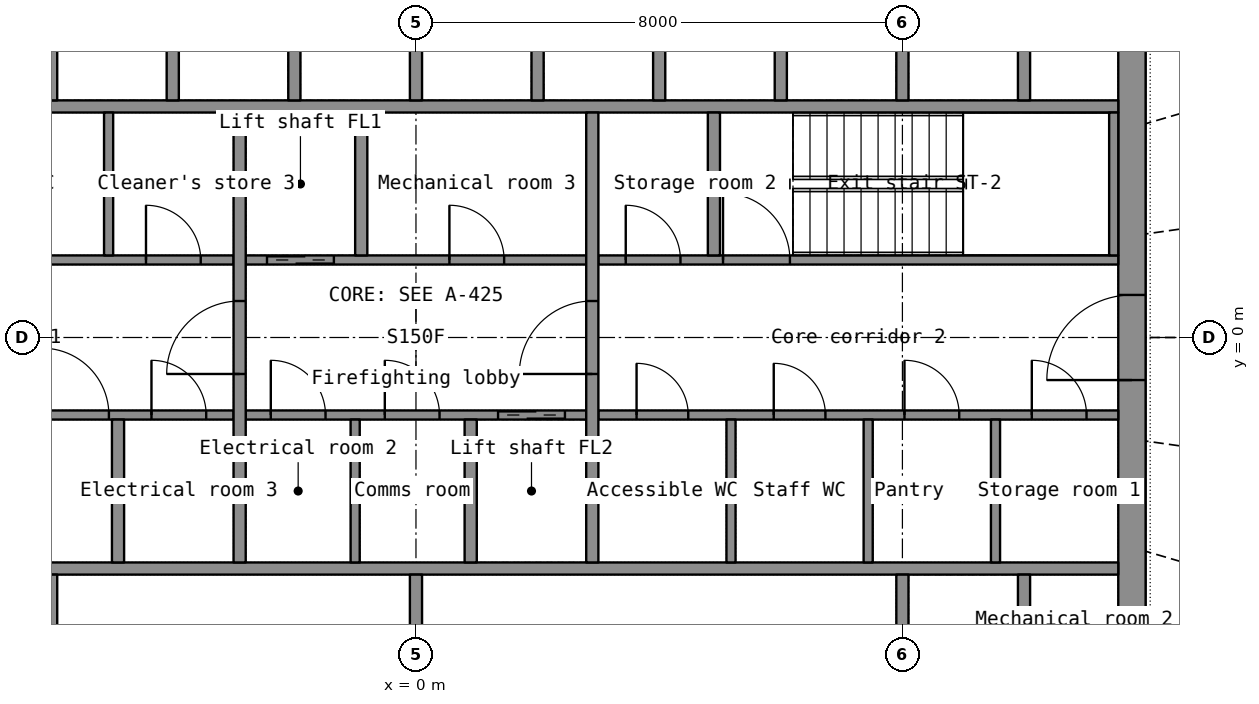
"""IFC4 building model, lengths in metres.
Left out: names, types, materials, properties, quantities, classifications, styles, units other than length and angle.
Written with IfcOpenShell. Run it as: python <this file> out.ifc"""

import sys

from ifc_helpers import new_model, si_unit, direction, frame, frame_2d, origin, place, context, subcontext, project, spatial, rectangle, extrude, element, fill, save


model = new_model("IFC4")
c1 = context("Model", 3, precision=1e-05, world=origin(), true_north=direction((0.0, 1.0)))
c2 = subcontext(c1, "Body", "Model", "MODEL_VIEW")
j1 = project(units=[si_unit("LENGTHUNIT", "METRE"), si_unit("PLANEANGLEUNIT", "RADIAN")], contexts=[c1])
p1 = place(None, origin())
s1 = spatial("IfcSite", under=j1, at=p1, CompositionType="ELEMENT")
p2 = place(p1, origin())
s2 = spatial("IfcBuilding", under=s1, at=p2, CompositionType="ELEMENT")
p3 = place(p2, frame((0.0, 0.0, 190.4)))
s3 = spatial("IfcBuildingStorey", under=s2, at=p3, CompositionType="ELEMENT", Elevation=190.4)
p4 = place(p3, frame((11.775, -7.2, 0.0), z_axis=(0.0, 0.0, 1.0), x_axis=(0.0, 1.0, 0.0)))
e1 = element("IfcWall", 1, at=p4, inside=s3, PredefinedType="SHEAR", context=c2, shape_type="SweptSolid", body=[
    extrude(rectangle(XDim=14.4, YDim=0.45, at=frame_2d((7.2, 0.0))), origin(), (0.0, 0.0, 1.0), 3.3),
])
p5 = place(p4, frame((6.5, 0.0, 0.0)))
e2 = element("IfcOpeningElement", 2, at=p5, cuts=e1, PredefinedType="OPENING", context=c2, shape_type="SweptSolid", body=[
    extrude(rectangle(XDim=1.4, YDim=2.2, at=frame_2d((0.7, 1.1))), frame((0.0, 0.235, 0.0), z_axis=(0.0, -1.0, 0.0), x_axis=(1.0, 0.0, 0.0)), (0.0, 0.0, 1.0), 0.47),
])
for number, where, z_axis, x_axis in (
    (3, (-11.55, -3.8, 0.0), (0.0, 0.0, 1.0), (1.0, 0.0, 0.0)),
    (4, (-11.55, 3.8, 0.0), (0.0, 0.0, 1.0), (1.0, 0.0, 0.0)),
):
    element("IfcWall", number, at=place(p3, frame(where, z_axis=z_axis, x_axis=x_axis)), inside=s3, PredefinedType="SHEAR", context=c2, shape_type="SweptSolid", body=[
        extrude(rectangle(XDim=23.1, YDim=0.2, at=frame_2d((11.55, 0.0))), origin(), (0.0, 0.0, 1.0), 3.3),
    ])
for number, where, z_axis, x_axis in (
    (5, (8.0, -6.75, 0.0), (0.0, 0.0, 1.0), (0.0, 1.0, 0.0)),
    (6, (10.0, -6.75, 0.0), (0.0, 0.0, 1.0), (0.0, 1.0, 0.0)),
):
    element("IfcWall", number, at=place(p3, frame(where, z_axis=z_axis, x_axis=x_axis)), inside=s3, PredefinedType="SHEAR", context=c2, shape_type="SweptSolid", body=[
        extrude(rectangle(XDim=2.85, YDim=0.2, at=frame_2d((1.425, 0.0))), origin(), (0.0, 0.0, 1.0), 3.3),
    ])
for number, where, z_axis, x_axis in (
    (7, (-6.0, -6.75, 0.0), (0.0, 0.0, 1.0), (0.0, 1.0, 0.0)),
    (8, (0.0, -6.75, 0.0), (0.0, 0.0, 1.0), (0.0, 1.0, 0.0)),
):
    element("IfcWall", number, at=place(p3, frame(where, z_axis=z_axis, x_axis=x_axis)), inside=s3, PredefinedType="PARTITIONING", context=c2, shape_type="SweptSolid", body=[
        extrude(rectangle(XDim=2.85, YDim=0.2, at=frame_2d((1.425, 0.0))), origin(), (0.0, 0.0, 1.0), 3.3),
    ])
for number, where, z_axis, x_axis in (
    (9, (-6.0, 3.9, 0.0), (0.0, 0.0, 1.0), (0.0, 1.0, 0.0)),
    (10, (-4.0, 3.9, 0.0), (0.0, 0.0, 1.0), (0.0, 1.0, 0.0)),
    (11, (-2.0, 3.9, 0.0), (0.0, 0.0, 1.0), (0.0, 1.0, 0.0)),
    (12, (0.0, 3.9, 0.0), (0.0, 0.0, 1.0), (0.0, 1.0, 0.0)),
    (13, (2.0, 3.9, 0.0), (0.0, 0.0, 1.0), (0.0, 1.0, 0.0)),
    (14, (4.0, 3.9, 0.0), (0.0, 0.0, 1.0), (0.0, 1.0, 0.0)),
    (15, (6.0, 3.9, 0.0), (0.0, 0.0, 1.0), (0.0, 1.0, 0.0)),
    (16, (8.0, 3.9, 0.0), (0.0, 0.0, 1.0), (0.0, 1.0, 0.0)),
    (17, (10.0, 3.9, 0.0), (0.0, 0.0, 1.0), (0.0, 1.0, 0.0)),
):
    element("IfcWall", number, at=place(p3, frame(where, z_axis=z_axis, x_axis=x_axis)), inside=s3, PredefinedType="SHEAR", context=c2, shape_type="SweptSolid", body=[
        extrude(rectangle(XDim=2.85, YDim=0.2, at=frame_2d((1.425, 0.0))), origin(), (0.0, 0.0, 1.0), 3.3),
    ])
p6 = place(p3, frame((-11.55, -1.275, 0.0), z_axis=(0.0, 0.0, 1.0), x_axis=(1.0, 0.0, 0.0)))
e18 = element("IfcWall", 18, at=p6, inside=s3, PredefinedType="SHEAR", context=c2, shape_type="SweptSolid", body=[
    extrude(rectangle(XDim=8.55, YDim=0.15, at=frame_2d((4.275, 0.0))), origin(), (0.0, 0.0, 1.0), 3.3),
])
p7 = place(p6, frame((5.4, 0.0, 0.0)))
e19 = element("IfcOpeningElement", 19, at=p7, cuts=e18, PredefinedType="OPENING", context=c2, shape_type="SweptSolid", body=[
    extrude(rectangle(XDim=1.1, YDim=2.15, at=frame_2d((0.55, 1.075))), frame((0.0, 0.085, 0.0), z_axis=(0.0, -1.0, 0.0), x_axis=(1.0, 0.0, 0.0)), (0.0, 0.0, 1.0), 0.17),
])
p8 = place(p6, frame((7.2, 0.0, 0.0)))
e20 = element("IfcOpeningElement", 20, at=p8, cuts=e18, PredefinedType="OPENING", context=c2, shape_type="SweptSolid", body=[
    extrude(rectangle(XDim=0.9, YDim=2.1, at=frame_2d((0.45, 1.05))), frame((0.0, 0.085, 0.0), z_axis=(0.0, -1.0, 0.0), x_axis=(1.0, 0.0, 0.0)), (0.0, 0.0, 1.0), 0.17),
])
p9 = place(p3, frame((-2.8, -1.275, 0.0), z_axis=(0.0, 0.0, 1.0), x_axis=(1.0, 0.0, 0.0)))
e21 = element("IfcWall", 21, at=p9, inside=s3, PredefinedType="SHEAR", context=c2, shape_type="SweptSolid", body=[
    extrude(rectangle(XDim=5.6, YDim=0.15, at=frame_2d((2.8, 0.0))), origin(), (0.0, 0.0, 1.0), 3.3),
])
p10 = place(p9, frame((4.15, 0.0, 0.0)))
e22 = element("IfcOpeningElement", 22, at=p10, cuts=e21, PredefinedType="OPENING", context=c2, shape_type="SweptSolid", body=[
    extrude(rectangle(XDim=1.1, YDim=2.2, at=frame_2d((0.55, 1.1))), frame((0.0, 0.085, 0.0), z_axis=(0.0, -1.0, 0.0), x_axis=(1.0, 0.0, 0.0)), (0.0, 0.0, 1.0), 0.17),
])
p11 = place(p9, frame((0.413, 0.0, 0.0)))
e23 = element("IfcOpeningElement", 23, at=p11, cuts=e21, PredefinedType="OPENING", context=c2, shape_type="SweptSolid", body=[
    extrude(rectangle(XDim=0.9, YDim=2.1, at=frame_2d((0.45, 1.05))), frame((0.0, 0.085, 0.0), z_axis=(0.0, -1.0, 0.0), x_axis=(1.0, 0.0, 0.0)), (0.0, 0.0, 1.0), 0.17),
])
p12 = place(p9, frame((2.288, 0.0, 0.0)))
e24 = element("IfcOpeningElement", 24, at=p12, cuts=e21, PredefinedType="OPENING", context=c2, shape_type="SweptSolid", body=[
    extrude(rectangle(XDim=0.9, YDim=2.1, at=frame_2d((0.45, 1.05))), frame((0.0, 0.085, 0.0), z_axis=(0.0, -1.0, 0.0), x_axis=(1.0, 0.0, 0.0)), (0.0, 0.0, 1.0), 0.17),
])
p13 = place(p3, frame((3.0, -1.275, 0.0), z_axis=(0.0, 0.0, 1.0), x_axis=(1.0, 0.0, 0.0)))
e25 = element("IfcWall", 25, at=p13, inside=s3, PredefinedType="PARTITIONING", context=c2, shape_type="SweptSolid", body=[
    extrude(rectangle(XDim=8.55, YDim=0.15, at=frame_2d((4.275, 0.0))), origin(), (0.0, 0.0, 1.0), 3.3),
])
p14 = place(p13, frame((0.628, 0.0, 0.0)))
e26 = element("IfcOpeningElement", 26, at=p14, cuts=e25, PredefinedType="OPENING", context=c2, shape_type="SweptSolid", body=[
    extrude(rectangle(XDim=0.85, YDim=2.1, at=frame_2d((0.425, 1.05))), frame((0.0, 0.085, 0.0), z_axis=(0.0, -1.0, 0.0), x_axis=(1.0, 0.0, 0.0)), (0.0, 0.0, 1.0), 0.17),
])
p15 = place(p13, frame((2.884, 0.0, 0.0)))
e27 = element("IfcOpeningElement", 27, at=p15, cuts=e25, PredefinedType="OPENING", context=c2, shape_type="SweptSolid", body=[
    extrude(rectangle(XDim=0.85, YDim=2.1, at=frame_2d((0.425, 1.05))), frame((0.0, 0.085, 0.0), z_axis=(0.0, -1.0, 0.0), x_axis=(1.0, 0.0, 0.0)), (0.0, 0.0, 1.0), 0.17),
])
p16 = place(p13, frame((5.034, 0.0, 0.0)))
e28 = element("IfcOpeningElement", 28, at=p16, cuts=e25, PredefinedType="OPENING", context=c2, shape_type="SweptSolid", body=[
    extrude(rectangle(XDim=0.9, YDim=2.1, at=frame_2d((0.45, 1.05))), frame((0.0, 0.085, 0.0), z_axis=(0.0, -1.0, 0.0), x_axis=(1.0, 0.0, 0.0)), (0.0, 0.0, 1.0), 0.17),
])
p17 = place(p13, frame((7.128, 0.0, 0.0)))
e29 = element("IfcOpeningElement", 29, at=p17, cuts=e25, PredefinedType="OPENING", context=c2, shape_type="SweptSolid", body=[
    extrude(rectangle(XDim=0.9, YDim=2.1, at=frame_2d((0.45, 1.05))), frame((0.0, 0.085, 0.0), z_axis=(0.0, -1.0, 0.0), x_axis=(1.0, 0.0, 0.0)), (0.0, 0.0, 1.0), 0.17),
])
p18 = place(p3, frame((-11.55, 1.275, 0.0), z_axis=(0.0, 0.0, 1.0), x_axis=(1.0, 0.0, 0.0)))
e30 = element("IfcWall", 30, at=p18, inside=s3, PredefinedType="PARTITIONING", context=c2, shape_type="SweptSolid", body=[
    extrude(rectangle(XDim=8.55, YDim=0.15, at=frame_2d((4.275, 0.0))), origin(), (0.0, 0.0, 1.0), 3.3),
])
p19 = place(p18, frame((1.143, 0.0, 0.0)))
e31 = element("IfcOpeningElement", 31, at=p19, cuts=e30, PredefinedType="OPENING", context=c2, shape_type="SweptSolid", body=[
    extrude(rectangle(XDim=0.85, YDim=2.1, at=frame_2d((0.425, 1.05))), frame((0.0, 0.085, 0.0), z_axis=(0.0, -1.0, 0.0), x_axis=(1.0, 0.0, 0.0)), (0.0, 0.0, 1.0), 0.17),
])
p20 = place(p18, frame((4.427, 0.0, 0.0)))
e32 = element("IfcOpeningElement", 32, at=p20, cuts=e30, PredefinedType="OPENING", context=c2, shape_type="SweptSolid", body=[
    extrude(rectangle(XDim=0.85, YDim=2.1, at=frame_2d((0.425, 1.05))), frame((0.0, 0.085, 0.0), z_axis=(0.0, -1.0, 0.0), x_axis=(1.0, 0.0, 0.0)), (0.0, 0.0, 1.0), 0.17),
])
p21 = place(p18, frame((7.11, 0.0, 0.0)))
e33 = element("IfcOpeningElement", 33, at=p21, cuts=e30, PredefinedType="OPENING", context=c2, shape_type="SweptSolid", body=[
    extrude(rectangle(XDim=0.9, YDim=2.1, at=frame_2d((0.45, 1.05))), frame((0.0, 0.085, 0.0), z_axis=(0.0, -1.0, 0.0), x_axis=(1.0, 0.0, 0.0)), (0.0, 0.0, 1.0), 0.17),
])
p22 = place(p3, frame((-2.8, 1.275, 0.0), z_axis=(0.0, 0.0, 1.0), x_axis=(1.0, 0.0, 0.0)))
e34 = element("IfcWall", 34, at=p22, inside=s3, PredefinedType="SHEAR", context=c2, shape_type="SweptSolid", body=[
    extrude(rectangle(XDim=5.6, YDim=0.15, at=frame_2d((2.8, 0.0))), origin(), (0.0, 0.0, 1.0), 3.3),
])
p23 = place(p22, frame((0.35, 0.0, 0.0)))
e35 = element("IfcOpeningElement", 35, at=p23, cuts=e34, PredefinedType="OPENING", context=c2, shape_type="SweptSolid", body=[
    extrude(rectangle(XDim=1.1, YDim=2.2, at=frame_2d((0.55, 1.1))), frame((0.0, 0.085, 0.0), z_axis=(0.0, -1.0, 0.0), x_axis=(1.0, 0.0, 0.0)), (0.0, 0.0, 1.0), 0.17),
])
p24 = place(p22, frame((3.35, 0.0, 0.0)))
e36 = element("IfcOpeningElement", 36, at=p24, cuts=e34, PredefinedType="OPENING", context=c2, shape_type="SweptSolid", body=[
    extrude(rectangle(XDim=0.9, YDim=2.1, at=frame_2d((0.45, 1.05))), frame((0.0, 0.085, 0.0), z_axis=(0.0, -1.0, 0.0), x_axis=(1.0, 0.0, 0.0)), (0.0, 0.0, 1.0), 0.17),
])
p25 = place(p3, frame((3.0, 1.275, 0.0), z_axis=(0.0, 0.0, 1.0), x_axis=(1.0, 0.0, 0.0)))
e37 = element("IfcWall", 37, at=p25, inside=s3, PredefinedType="SHEAR", context=c2, shape_type="SweptSolid", body=[
    extrude(rectangle(XDim=8.55, YDim=0.15, at=frame_2d((4.275, 0.0))), origin(), (0.0, 0.0, 1.0), 3.3),
])
p26 = place(p25, frame((2.05, 0.0, 0.0)))
e38 = element("IfcOpeningElement", 38, at=p26, cuts=e37, PredefinedType="OPENING", context=c2, shape_type="SweptSolid", body=[
    extrude(rectangle(XDim=1.1, YDim=2.15, at=frame_2d((0.55, 1.075))), frame((0.0, 0.085, 0.0), z_axis=(0.0, -1.0, 0.0), x_axis=(1.0, 0.0, 0.0)), (0.0, 0.0, 1.0), 0.17),
])
p27 = place(p25, frame((0.45, 0.0, 0.0)))
e39 = element("IfcOpeningElement", 39, at=p27, cuts=e37, PredefinedType="OPENING", context=c2, shape_type="SweptSolid", body=[
    extrude(rectangle(XDim=0.9, YDim=2.1, at=frame_2d((0.45, 1.05))), frame((0.0, 0.085, 0.0), z_axis=(0.0, -1.0, 0.0), x_axis=(1.0, 0.0, 0.0)), (0.0, 0.0, 1.0), 0.17),
])
p28 = place(p3, frame((-2.9, -3.7, 0.0), z_axis=(0.0, 0.0, 1.0), x_axis=(0.0, 1.0, 0.0)))
e40 = element("IfcWall", 40, at=p28, inside=s3, PredefinedType="SHEAR", context=c2, shape_type="SweptSolid", body=[
    extrude(rectangle(XDim=7.4, YDim=0.2, at=frame_2d((3.7, 0.0))), origin(), (0.0, 0.0, 1.0), 3.3),
])
p29 = place(p28, frame((3.1, 0.0, 0.0)))
e41 = element("IfcOpeningElement", 41, at=p29, cuts=e40, PredefinedType="OPENING", context=c2, shape_type="SweptSolid", body=[
    extrude(rectangle(XDim=1.2, YDim=2.2, at=frame_2d((0.6, 1.1))), frame((0.0, 0.11, 0.0), z_axis=(0.0, -1.0, 0.0), x_axis=(1.0, 0.0, 0.0)), (0.0, 0.0, 1.0), 0.22),
])
p30 = place(p3, frame((2.9, -3.7, 0.0), z_axis=(0.0, 0.0, 1.0), x_axis=(0.0, 1.0, 0.0)))
e42 = element("IfcWall", 42, at=p30, inside=s3, PredefinedType="SHEAR", context=c2, shape_type="SweptSolid", body=[
    extrude(rectangle(XDim=7.4, YDim=0.2, at=frame_2d((3.7, 0.0))), origin(), (0.0, 0.0, 1.0), 3.3),
])
p31 = place(p30, frame((3.1, 0.0, 0.0)))
e43 = element("IfcOpeningElement", 43, at=p31, cuts=e42, PredefinedType="OPENING", context=c2, shape_type="SweptSolid", body=[
    extrude(rectangle(XDim=1.2, YDim=2.2, at=frame_2d((0.6, 1.1))), frame((0.0, 0.11, 0.0), z_axis=(0.0, -1.0, 0.0), x_axis=(1.0, 0.0, 0.0)), (0.0, 0.0, 1.0), 0.22),
])
for number, where, z_axis, x_axis in (
    (44, (-0.9, 1.35, 0.0), (0.0, 0.0, 1.0), (0.0, 1.0, 0.0)),
    (45, (0.9, -3.7, 0.0), (0.0, 0.0, 1.0), (0.0, 1.0, 0.0)),
):
    element("IfcWall", number, at=place(p3, frame(where, z_axis=z_axis, x_axis=x_axis)), inside=s3, PredefinedType="SHEAR", context=c2, shape_type="SweptSolid", body=[
        extrude(rectangle(XDim=2.35, YDim=0.2, at=frame_2d((1.175, 0.0))), origin(), (0.0, 0.0, 1.0), 3.3),
    ])
p32 = place(p3, frame((11.475, 1.35, 0.0), z_axis=(0.0, 0.0, 1.0), x_axis=(0.0, 1.0, 0.0)))
e46 = element("IfcWall", 46, at=p32, inside=s3, PredefinedType="SHEAR", context=c2, shape_type="SweptSolid", body=[
    extrude(rectangle(XDim=2.35, YDim=0.15, at=frame_2d((1.175, 0.0))), origin(), (0.0, 0.0, 1.0), 3.3),
])
for number, where, z_axis, x_axis in (
    (47, (-4.9, -3.7, 0.0), (0.0, 0.0, 1.0), (0.0, 1.0, 0.0)),
    (48, (4.9, 1.35, 0.0), (0.0, 0.0, 1.0), (0.0, 1.0, 0.0)),
):
    element("IfcWall", number, at=place(p3, frame(where, z_axis=z_axis, x_axis=x_axis)), inside=s3, PredefinedType="SHEAR", context=c2, shape_type="SweptSolid", body=[
        extrude(rectangle(XDim=2.35, YDim=0.2, at=frame_2d((1.175, 0.0))), origin(), (0.0, 0.0, 1.0), 3.3),
    ])
for number, where, z_axis, x_axis in (
    (49, (-5.055, 1.35, 0.0), (0.0, 0.0, 1.0), (0.0, 1.0, 0.0)),
    (50, (5.181, -3.7, 0.0), (0.0, 0.0, 1.0), (0.0, 1.0, 0.0)),
    (51, (7.437, -3.7, 0.0), (0.0, 0.0, 1.0), (0.0, 1.0, 0.0)),
    (52, (9.531, -3.7, 0.0), (0.0, 0.0, 1.0), (0.0, 1.0, 0.0)),
    (53, (-1.0, -3.7, 0.0), (0.0, 0.0, 1.0), (0.0, 1.0, 0.0)),
):
    element("IfcWall", number, at=place(p3, frame(where, z_axis=z_axis, x_axis=x_axis)), inside=s3, PredefinedType="PARTITIONING", context=c2, shape_type="SweptSolid", body=[
        extrude(rectangle(XDim=2.35, YDim=0.15, at=frame_2d((1.175, 0.0))), origin(), (0.0, 0.0, 1.0), 3.3),
    ])
p33 = place(p5, origin())
e54 = element("IfcDoor", 54, at=p33, inside=s3, OperationType="DOUBLE_DOOR_SINGLE_SWING", PredefinedType="DOOR", context=c2, shape_type="SweptSolid", body=[
    extrude(rectangle(XDim=1.4, YDim=2.2, at=frame_2d((0.7, 1.1))), frame((0.0, 0.025, 0.0), z_axis=(0.0, -1.0, 0.0), x_axis=(1.0, 0.0, 0.0)), (0.0, 0.0, 1.0), 0.05),
])
fill(e2, e54)
p34 = place(p29, origin())
e55 = element("IfcDoor", 55, at=p34, inside=s3, OperationType="SINGLE_SWING_LEFT", PredefinedType="DOOR", context=c2, shape_type="SweptSolid", body=[
    extrude(rectangle(XDim=1.2, YDim=2.2, at=frame_2d((0.6, 1.1))), frame((0.0, 0.025, 0.0), z_axis=(0.0, -1.0, 0.0), x_axis=(1.0, 0.0, 0.0)), (0.0, 0.0, 1.0), 0.05),
])
fill(e41, e55)
p35 = place(p31, origin())
e56 = element("IfcDoor", 56, at=p35, inside=s3, OperationType="SINGLE_SWING_LEFT", PredefinedType="DOOR", context=c2, shape_type="SweptSolid", body=[
    extrude(rectangle(XDim=1.2, YDim=2.2, at=frame_2d((0.6, 1.1))), frame((0.0, 0.025, 0.0), z_axis=(0.0, -1.0, 0.0), x_axis=(1.0, 0.0, 0.0)), (0.0, 0.0, 1.0), 0.05),
])
fill(e43, e56)
p36 = place(p23, origin())
e57 = element("IfcDoor", 57, at=p36, inside=s3, OperationType="DOUBLE_DOOR_SLIDING", PredefinedType="DOOR", context=c2, shape_type="SweptSolid", body=[
    extrude(rectangle(XDim=1.1, YDim=2.2, at=frame_2d((0.55, 1.1))), frame((0.0, 0.025, 0.0), z_axis=(0.0, -1.0, 0.0), x_axis=(1.0, 0.0, 0.0)), (0.0, 0.0, 1.0), 0.05),
])
fill(e35, e57)
p37 = place(p10, origin())
e58 = element("IfcDoor", 58, at=p37, inside=s3, OperationType="DOUBLE_DOOR_SLIDING", PredefinedType="DOOR", context=c2, shape_type="SweptSolid", body=[
    extrude(rectangle(XDim=1.1, YDim=2.2, at=frame_2d((0.55, 1.1))), frame((0.0, 0.025, 0.0), z_axis=(0.0, -1.0, 0.0), x_axis=(1.0, 0.0, 0.0)), (0.0, 0.0, 1.0), 0.05),
])
fill(e22, e58)
p38 = place(p7, origin())
e59 = element("IfcDoor", 59, at=p38, inside=s3, OperationType="SINGLE_SWING_LEFT", PredefinedType="DOOR", context=c2, shape_type="SweptSolid", body=[
    extrude(rectangle(XDim=1.1, YDim=2.15, at=frame_2d((0.55, 1.075))), frame((0.0, 0.025, 0.0), z_axis=(0.0, -1.0, 0.0), x_axis=(1.0, 0.0, 0.0)), (0.0, 0.0, 1.0), 0.05),
])
fill(e19, e59)
p39 = place(p26, origin())
e60 = element("IfcDoor", 60, at=p39, inside=s3, OperationType="SINGLE_SWING_LEFT", PredefinedType="DOOR", context=c2, shape_type="SweptSolid", body=[
    extrude(rectangle(XDim=1.1, YDim=2.15, at=frame_2d((0.55, 1.075))), frame((0.0, 0.025, 0.0), z_axis=(0.0, -1.0, 0.0), x_axis=(1.0, 0.0, 0.0)), (0.0, 0.0, 1.0), 0.05),
])
fill(e38, e60)
p40 = place(p21, origin())
e61 = element("IfcDoor", 61, at=p40, inside=s3, OperationType="SINGLE_SWING_LEFT", PredefinedType="DOOR", context=c2, shape_type="SweptSolid", body=[
    extrude(rectangle(XDim=0.9, YDim=2.1, at=frame_2d((0.45, 1.05))), frame((0.0, 0.025, 0.0), z_axis=(0.0, -1.0, 0.0), x_axis=(1.0, 0.0, 0.0)), (0.0, 0.0, 1.0), 0.05),
])
fill(e33, e61)
p41 = place(p14, origin())
e62 = element("IfcDoor", 62, at=p41, inside=s3, OperationType="SINGLE_SWING_LEFT", PredefinedType="DOOR", context=c2, shape_type="SweptSolid", body=[
    extrude(rectangle(XDim=0.85, YDim=2.1, at=frame_2d((0.425, 1.05))), frame((0.0, 0.025, 0.0), z_axis=(0.0, -1.0, 0.0), x_axis=(1.0, 0.0, 0.0)), (0.0, 0.0, 1.0), 0.05),
])
fill(e26, e62)
p42 = place(p15, origin())
e63 = element("IfcDoor", 63, at=p42, inside=s3, OperationType="SINGLE_SWING_LEFT", PredefinedType="DOOR", context=c2, shape_type="SweptSolid", body=[
    extrude(rectangle(XDim=0.85, YDim=2.1, at=frame_2d((0.425, 1.05))), frame((0.0, 0.025, 0.0), z_axis=(0.0, -1.0, 0.0), x_axis=(1.0, 0.0, 0.0)), (0.0, 0.0, 1.0), 0.05),
])
fill(e27, e63)
p43 = place(p16, origin())
e64 = element("IfcDoor", 64, at=p43, inside=s3, OperationType="SINGLE_SWING_LEFT", PredefinedType="DOOR", context=c2, shape_type="SweptSolid", body=[
    extrude(rectangle(XDim=0.9, YDim=2.1, at=frame_2d((0.45, 1.05))), frame((0.0, 0.025, 0.0), z_axis=(0.0, -1.0, 0.0), x_axis=(1.0, 0.0, 0.0)), (0.0, 0.0, 1.0), 0.05),
])
fill(e28, e64)
p44 = place(p17, origin())
e65 = element("IfcDoor", 65, at=p44, inside=s3, OperationType="SINGLE_SWING_LEFT", PredefinedType="DOOR", context=c2, shape_type="SweptSolid", body=[
    extrude(rectangle(XDim=0.9, YDim=2.1, at=frame_2d((0.45, 1.05))), frame((0.0, 0.025, 0.0), z_axis=(0.0, -1.0, 0.0), x_axis=(1.0, 0.0, 0.0)), (0.0, 0.0, 1.0), 0.05),
])
fill(e29, e65)
p45 = place(p24, origin())
e66 = element("IfcDoor", 66, at=p45, inside=s3, OperationType="SINGLE_SWING_LEFT", PredefinedType="DOOR", context=c2, shape_type="SweptSolid", body=[
    extrude(rectangle(XDim=0.9, YDim=2.1, at=frame_2d((0.45, 1.05))), frame((0.0, 0.025, 0.0), z_axis=(0.0, -1.0, 0.0), x_axis=(1.0, 0.0, 0.0)), (0.0, 0.0, 1.0), 0.05),
])
fill(e36, e66)
p46 = place(p11, origin())
e67 = element("IfcDoor", 67, at=p46, inside=s3, OperationType="SINGLE_SWING_LEFT", PredefinedType="DOOR", context=c2, shape_type="SweptSolid", body=[
    extrude(rectangle(XDim=0.9, YDim=2.1, at=frame_2d((0.45, 1.05))), frame((0.0, 0.025, 0.0), z_axis=(0.0, -1.0, 0.0), x_axis=(1.0, 0.0, 0.0)), (0.0, 0.0, 1.0), 0.05),
])
fill(e23, e67)
p47 = place(p12, origin())
e68 = element("IfcDoor", 68, at=p47, inside=s3, OperationType="SINGLE_SWING_LEFT", PredefinedType="DOOR", context=c2, shape_type="SweptSolid", body=[
    extrude(rectangle(XDim=0.9, YDim=2.1, at=frame_2d((0.45, 1.05))), frame((0.0, 0.025, 0.0), z_axis=(0.0, -1.0, 0.0), x_axis=(1.0, 0.0, 0.0)), (0.0, 0.0, 1.0), 0.05),
])
fill(e24, e68)
p48 = place(p27, origin())
e69 = element("IfcDoor", 69, at=p48, inside=s3, OperationType="SINGLE_SWING_LEFT", PredefinedType="DOOR", context=c2, shape_type="SweptSolid", body=[
    extrude(rectangle(XDim=0.9, YDim=2.1, at=frame_2d((0.45, 1.05))), frame((0.0, 0.025, 0.0), z_axis=(0.0, -1.0, 0.0), x_axis=(1.0, 0.0, 0.0)), (0.0, 0.0, 1.0), 0.05),
])
fill(e39, e69)
p49 = place(p8, origin())
e70 = element("IfcDoor", 70, at=p49, inside=s3, OperationType="SINGLE_SWING_LEFT", PredefinedType="DOOR", context=c2, shape_type="SweptSolid", body=[
    extrude(rectangle(XDim=0.9, YDim=2.1, at=frame_2d((0.45, 1.05))), frame((0.0, 0.025, 0.0), z_axis=(0.0, -1.0, 0.0), x_axis=(1.0, 0.0, 0.0)), (0.0, 0.0, 1.0), 0.05),
])
fill(e20, e70)
save(model, sys.argv[1])
